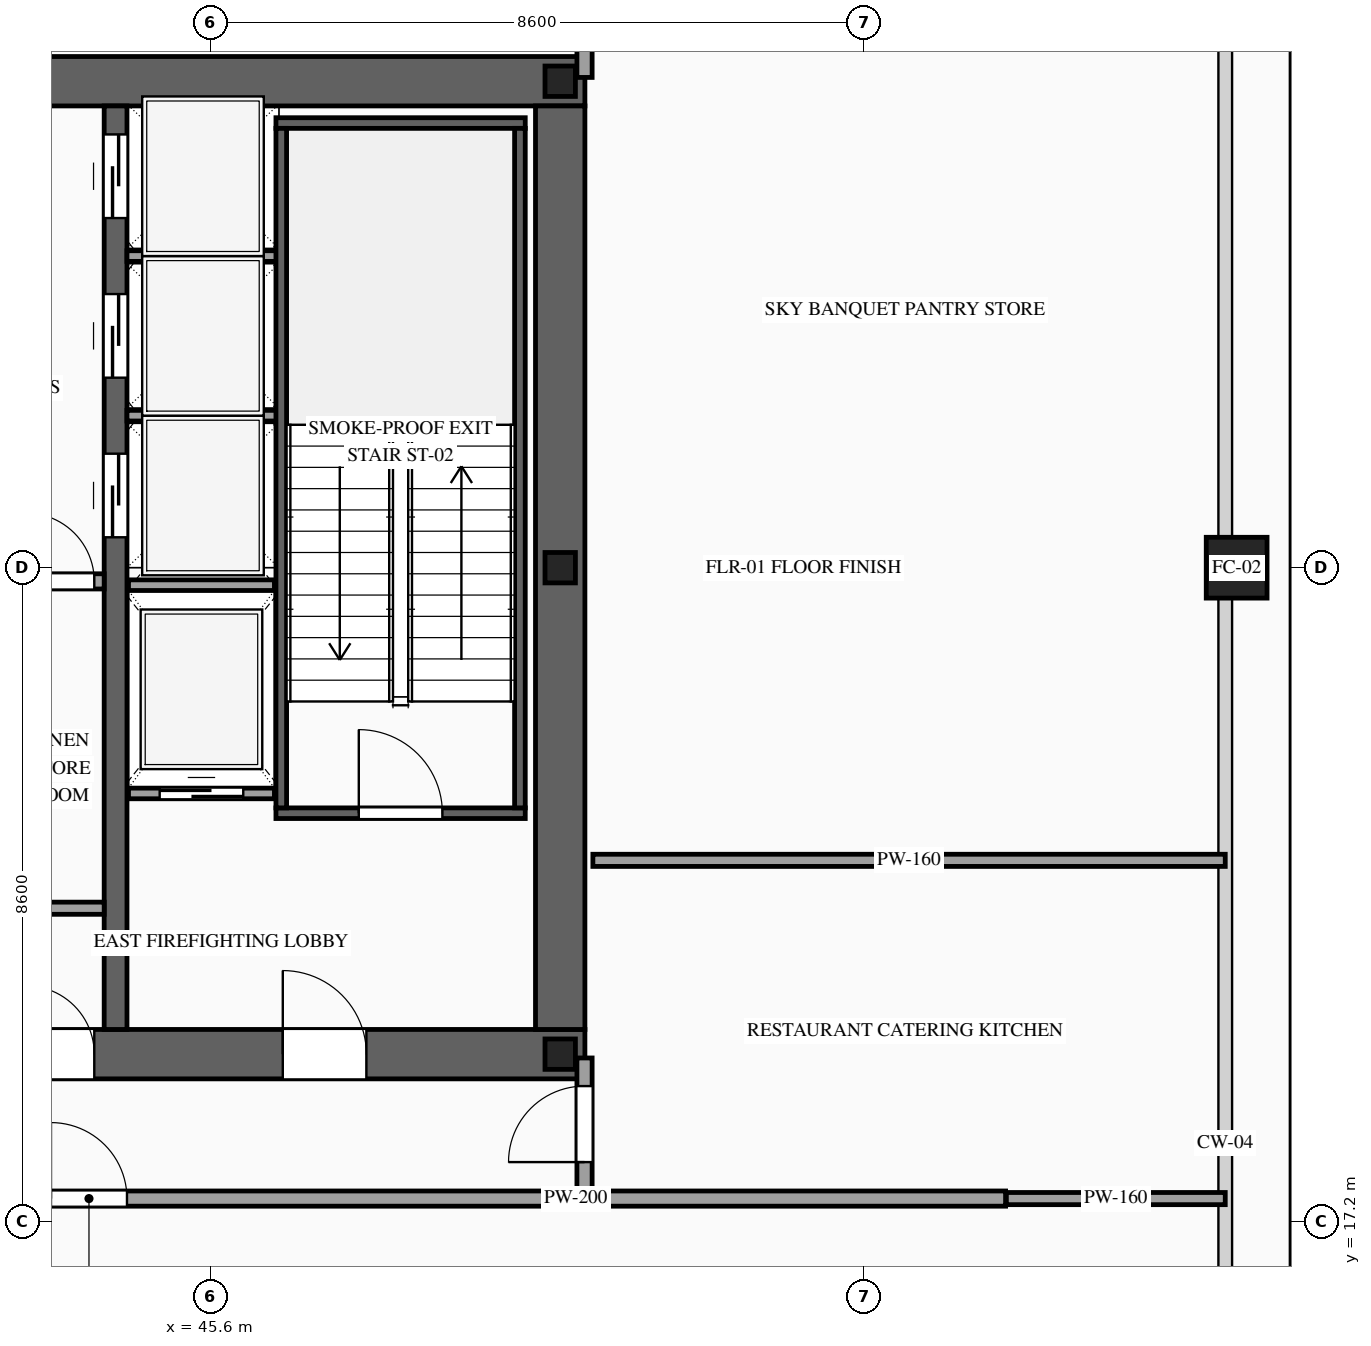
"""IFC4 building model, lengths in metres.
Left out: names, types, materials, properties, quantities, classifications, styles, units other than length and angle.
Written with IfcOpenShell. Run it as: python <this file> out.ifc"""

import sys

from ifc_helpers import new_model, si_unit, direction, frame, frame_2d, origin, origin_2d, place, context, subcontext, project, spatial, rectangle, hollow_rectangle, i_section, extrude, source, transform, mapped, element, fill, save


model = new_model("IFC4")
c1 = context("Model", 3, precision=1e-05, world=origin(), true_north=direction((0.0, 1.0)))
c2 = subcontext(c1, "Body", "Model", "MODEL_VIEW")
j1 = project(units=[si_unit("LENGTHUNIT", "METRE"), si_unit("PLANEANGLEUNIT", "RADIAN")], contexts=[c1])
p1 = place(None, origin())
s1 = spatial("IfcSite", under=j1, at=p1, CompositionType="ELEMENT")
p2 = place(p1, origin())
s2 = spatial("IfcBuilding", under=s1, at=p2, CompositionType="ELEMENT")
p3 = place(p2, frame((0.0, 0.0, 166.8)))
s3 = spatial("IfcBuildingStorey", under=s2, at=p3, CompositionType="ELEMENT", Elevation=166.8)
p4 = place(p3, frame((23.475, 19.4, 0.0), z_axis=(0.0, 0.0, 1.0), x_axis=(1.0, 0.0, 0.0)))
e1 = element("IfcWall", 1, at=p4, inside=s3, PredefinedType="SHEAR", context=c2, shape_type="SweptSolid", body=[
    extrude(rectangle(XDim=27.05, YDim=0.65, at=frame_2d((13.525, 0.0))), origin(), (0.0, 0.0, 1.0), 4.8),
])
p5 = place(p4, frame((1.975, 0.0, 0.0)))
e2 = element("IfcOpeningElement", 2, at=p5, cuts=e1, PredefinedType="OPENING", context=c2, shape_type="SweptSolid", body=[
    extrude(rectangle(XDim=1.1, YDim=2.2, at=frame_2d((0.55, 1.1))), frame((0.0, 0.34, 0.0), z_axis=(0.0, -1.0, 0.0), x_axis=(1.0, 0.0, 0.0)), (0.0, 0.0, 1.0), 0.68),
])
p6 = place(p4, frame((9.875, 0.0, 0.0)))
e3 = element("IfcOpeningElement", 3, at=p6, cuts=e1, PredefinedType="OPENING", context=c2, shape_type="SweptSolid", body=[
    extrude(rectangle(XDim=1.1, YDim=2.2, at=frame_2d((0.55, 1.1))), frame((0.0, 0.34, 0.0), z_axis=(0.0, -1.0, 0.0), x_axis=(1.0, 0.0, 0.0)), (0.0, 0.0, 1.0), 0.68),
])
p7 = place(p4, frame((23.075, 0.0, 0.0)))
e4 = element("IfcOpeningElement", 4, at=p7, cuts=e1, PredefinedType="OPENING", context=c2, shape_type="SweptSolid", body=[
    extrude(rectangle(XDim=1.1, YDim=2.2, at=frame_2d((0.55, 1.1))), frame((0.0, 0.34, 0.0), z_axis=(0.0, -1.0, 0.0), x_axis=(1.0, 0.0, 0.0)), (0.0, 0.0, 1.0), 0.68),
])
p8 = place(p4, frame((19.695, 0.0, 0.0)))
e5 = element("IfcOpeningElement", 5, at=p8, cuts=e1, PredefinedType="OPENING", context=c2, shape_type="SweptSolid", body=[
    extrude(rectangle(XDim=0.9, YDim=2.15, at=frame_2d((0.45, 1.075))), frame((0.0, 0.34, 0.0), z_axis=(0.0, -1.0, 0.0), x_axis=(1.0, 0.0, 0.0)), (0.0, 0.0, 1.0), 0.68),
])
p9 = place(p4, frame((18.255, 0.0, 0.0)))
e6 = element("IfcOpeningElement", 6, at=p9, cuts=e1, PredefinedType="OPENING", context=c2, shape_type="SweptSolid", body=[
    extrude(rectangle(XDim=0.9, YDim=2.15, at=frame_2d((0.45, 1.075))), frame((0.0, 0.34, 0.0), z_axis=(0.0, -1.0, 0.0), x_axis=(1.0, 0.0, 0.0)), (0.0, 0.0, 1.0), 0.68),
])
p10 = place(p3, frame((23.475, 32.2, 0.0), z_axis=(0.0, 0.0, 1.0), x_axis=(1.0, 0.0, 0.0)))
e7 = element("IfcWall", 7, at=p10, inside=s3, PredefinedType="SHEAR", context=c2, shape_type="SweptSolid", body=[
    extrude(rectangle(XDim=27.05, YDim=0.65, at=frame_2d((13.525, 0.0))), origin(), (0.0, 0.0, 1.0), 4.8),
])
p11 = place(p10, frame((4.595, 0.0, 0.0)))
e8 = element("IfcOpeningElement", 8, at=p11, cuts=e7, PredefinedType="OPENING", context=c2, shape_type="SweptSolid", body=[
    extrude(rectangle(XDim=0.9, YDim=2.15, at=frame_2d((0.45, 1.075))), frame((0.0, 0.34, 0.0), z_axis=(0.0, -1.0, 0.0), x_axis=(1.0, 0.0, 0.0)), (0.0, 0.0, 1.0), 0.68),
])
p12 = place(p10, frame((9.875, 0.0, 0.0)))
e9 = element("IfcOpeningElement", 9, at=p12, cuts=e7, PredefinedType="OPENING", context=c2, shape_type="SweptSolid", body=[
    extrude(rectangle(XDim=1.1, YDim=2.2, at=frame_2d((0.55, 1.1))), frame((0.0, 0.34, 0.0), z_axis=(0.0, -1.0, 0.0), x_axis=(1.0, 0.0, 0.0)), (0.0, 0.0, 1.0), 0.68),
])
p13 = place(p10, frame((15.725, 0.0, 0.0)))
e10 = element("IfcOpeningElement", 10, at=p13, cuts=e7, PredefinedType="OPENING", context=c2, shape_type="SweptSolid", body=[
    extrude(rectangle(XDim=1.1, YDim=2.2, at=frame_2d((0.55, 1.1))), frame((0.0, 0.34, 0.0), z_axis=(0.0, -1.0, 0.0), x_axis=(1.0, 0.0, 0.0)), (0.0, 0.0, 1.0), 0.68),
])
p14 = place(p10, frame((18.825, 0.0, 0.0)))
e11 = element("IfcOpeningElement", 11, at=p14, cuts=e7, PredefinedType="OPENING", context=c2, shape_type="SweptSolid", body=[
    extrude(rectangle(XDim=1.1, YDim=2.2, at=frame_2d((0.55, 1.1))), frame((0.0, 0.34, 0.0), z_axis=(0.0, -1.0, 0.0), x_axis=(1.0, 0.0, 0.0)), (0.0, 0.0, 1.0), 0.68),
])
m1 = source(origin(), c2, "Body", "SweptSolid", [
    extrude(rectangle(XDim=12.15, YDim=0.65, at=frame_2d((6.075, 0.0))), origin(), (0.0, 0.0, 1.0), 4.8),
])
p15 = place(p3, frame((50.2, 19.725, 0.0), z_axis=(0.0, 0.0, 1.0), x_axis=(0.0, 1.0, 0.0)))
e12 = element("IfcWall", 12, at=p15, inside=s3, PredefinedType="SHEAR", context=c2, shape_type="MappedRepresentation", body=[
    mapped(m1, transform((0.0, 0.0, 0.0), scale=1.0)),
])
p16 = place(p3, frame((44.35, 19.725, 0.0), z_axis=(0.0, 0.0, 1.0), x_axis=(0.0, 1.0, 0.0)))
e13 = element("IfcWall", 13, at=p16, inside=s3, PredefinedType="SOLIDWALL", context=c2, shape_type="SweptSolid", body=[
    extrude(rectangle(XDim=12.15, YDim=0.3, at=frame_2d((6.075, 0.0))), origin(), (0.0, 0.0, 1.0), 4.8),
])
p17 = place(p16, frame((6.475, 0.0, 0.0)))
e14 = element("IfcOpeningElement", 14, at=p17, cuts=e13, PredefinedType="OPENING", context=c2, shape_type="SweptSolid", body=[
    extrude(rectangle(XDim=1.1, YDim=2.2, at=frame_2d((0.55, 1.1))), frame((0.0, 0.165, 0.0), z_axis=(0.0, -1.0, 0.0), x_axis=(1.0, 0.0, 0.0)), (0.0, 0.0, 1.0), 0.33),
])
p18 = place(p16, frame((8.575, 0.0, 0.0)))
e15 = element("IfcOpeningElement", 15, at=p18, cuts=e13, PredefinedType="OPENING", context=c2, shape_type="SweptSolid", body=[
    extrude(rectangle(XDim=1.1, YDim=2.2, at=frame_2d((0.55, 1.1))), frame((0.0, 0.165, 0.0), z_axis=(0.0, -1.0, 0.0), x_axis=(1.0, 0.0, 0.0)), (0.0, 0.0, 1.0), 0.33),
])
p19 = place(p16, frame((10.675, 0.0, 0.0)))
e16 = element("IfcOpeningElement", 16, at=p19, cuts=e13, PredefinedType="OPENING", context=c2, shape_type="SweptSolid", body=[
    extrude(rectangle(XDim=1.1, YDim=2.2, at=frame_2d((0.55, 1.1))), frame((0.0, 0.165, 0.0), z_axis=(0.0, -1.0, 0.0), x_axis=(1.0, 0.0, 0.0)), (0.0, 0.0, 1.0), 0.33),
])
m2 = source(origin(), c2, "Body", "SweptSolid", [
    extrude(i_section(OverallWidth=0.4, OverallDepth=0.4, WebThickness=0.013, FlangeThickness=0.021, at=origin_2d()), origin(), (0.0, 0.0, 1.0), 4.8),
])
for number, where, z_axis, x_axis in (
    (17, (50.2, 19.4, 0.0), (0.0, 0.0, 1.0), (1.0, 0.0, 0.0)),
    (18, (50.2, 25.8, 0.0), (0.0, 0.0, 1.0), (1.0, 0.0, 0.0)),
    (19, (50.2, 32.2, 0.0), (0.0, 0.0, 1.0), (1.0, 0.0, 0.0)),
):
    element("IfcColumn", number, at=place(p3, frame(where, z_axis=z_axis, x_axis=x_axis)), inside=s3, PredefinedType="COLUMN", context=c2, shape_type="MappedRepresentation", body=[
        mapped(m2, transform((0.0, 0.0, 0.0), scale=1.0)),
    ])
m3 = source(origin(), c2, "Body", "SweptSolid", [
    extrude(hollow_rectangle(XDim=0.8, YDim=0.8, WallThickness=0.036, at=origin_2d()), origin(), (0.0, 0.0, 1.0), 4.8),
])
p20 = place(p3, frame((59.1, 25.8, 0.0), z_axis=(0.0, 0.0, 1.0), x_axis=(1.0, 0.0, 0.0)))
e20 = element("IfcColumn", 20, at=p20, inside=s3, PredefinedType="COLUMN", context=c2, shape_type="MappedRepresentation", body=[
    mapped(m3, transform((0.0, 0.0, 0.0), scale=1.0)),
])
p21 = place(p3, frame((44.52, 22.83, 0.0), z_axis=(0.0, 0.0, 1.0), x_axis=(1.0, 0.0, 0.0)))
e21 = element("IfcWall", 21, at=p21, inside=s3, PredefinedType="SOLIDWALL", context=c2, shape_type="SweptSolid", body=[
    extrude(rectangle(XDim=1.92, YDim=0.14, at=frame_2d((0.96, 0.0))), origin(), (0.0, 0.0, 1.0), 4.5),
])
p22 = place(p21, frame((0.41, 0.0, 0.0)))
e22 = element("IfcOpeningElement", 22, at=p22, cuts=e21, PredefinedType="OPENING", context=c2, shape_type="SweptSolid", body=[
    extrude(rectangle(XDim=1.1, YDim=2.2, at=frame_2d((0.55, 1.1))), frame((0.0, 0.085, 0.0), z_axis=(0.0, -1.0, 0.0), x_axis=(1.0, 0.0, 0.0)), (0.0, 0.0, 1.0), 0.17),
])
m4 = source(origin(), c2, "Body", "SweptSolid", [
    extrude(rectangle(XDim=1.92, YDim=0.14, at=frame_2d((0.96, 0.0))), origin(), (0.0, 0.0, 1.0), 4.5),
])
p23 = place(p3, frame((44.52, 25.57, 0.0), z_axis=(0.0, 0.0, 1.0), x_axis=(1.0, 0.0, 0.0)))
e23 = element("IfcWall", 23, at=p23, inside=s3, PredefinedType="SOLIDWALL", context=c2, shape_type="MappedRepresentation", body=[
    mapped(m4, transform((0.0, 0.0, 0.0), scale=1.0)),
])
m5 = source(origin(), c2, "Body", "SweptSolid", [
    extrude(rectangle(XDim=2.0, YDim=0.14, at=frame_2d((1.0, 0.0))), origin(), (0.0, 0.0, 1.0), 4.5),
])
for number, where, z_axis, x_axis in (
    (24, (44.5, 27.8, 0.0), (0.0, 0.0, 1.0), (1.0, 0.0, 0.0)),
    (25, (44.5, 29.9, 0.0), (0.0, 0.0, 1.0), (1.0, 0.0, 0.0)),
):
    element("IfcWall", number, at=place(p3, frame(where, z_axis=z_axis, x_axis=x_axis)), inside=s3, PredefinedType="SOLIDWALL", context=c2, shape_type="MappedRepresentation", body=[
        mapped(m5, transform((0.0, 0.0, 0.0), scale=1.0)),
    ])
p24 = place(p3, frame((46.46, 22.57, 0.0), z_axis=(0.0, 0.0, 1.0), x_axis=(1.0, 0.0, 0.0)))
e26 = element("IfcWall", 26, at=p24, inside=s3, PredefinedType="SOLIDWALL", context=c2, shape_type="SweptSolid", body=[
    extrude(rectangle(XDim=3.28, YDim=0.14, at=frame_2d((1.64, 0.0))), origin(), (0.0, 0.0, 1.0), 4.5),
])
p25 = place(p24, frame((1.09, 0.0, 0.0)))
e27 = element("IfcOpeningElement", 27, at=p25, cuts=e26, PredefinedType="OPENING", context=c2, shape_type="SweptSolid", body=[
    extrude(rectangle(XDim=1.1, YDim=2.2, at=frame_2d((0.55, 1.1))), frame((0.0, 0.085, 0.0), z_axis=(0.0, -1.0, 0.0), x_axis=(1.0, 0.0, 0.0)), (0.0, 0.0, 1.0), 0.17),
])
m6 = source(origin(), c2, "Body", "SweptSolid", [
    extrude(rectangle(XDim=3.28, YDim=0.14, at=frame_2d((1.64, 0.0))), origin(), (0.0, 0.0, 1.0), 4.5),
])
p26 = place(p3, frame((46.46, 31.65, 0.0), z_axis=(0.0, 0.0, 1.0), x_axis=(1.0, 0.0, 0.0)))
e28 = element("IfcWall", 28, at=p26, inside=s3, PredefinedType="SOLIDWALL", context=c2, shape_type="MappedRepresentation", body=[
    mapped(m6, transform((0.0, 0.0, 0.0), scale=1.0)),
])
m7 = source(origin(), c2, "Body", "SweptSolid", [
    extrude(rectangle(XDim=8.94, YDim=0.14, at=frame_2d((4.47, 0.0))), origin(), (0.0, 0.0, 1.0), 4.5),
])
for number, where, z_axis, x_axis in (
    (29, (46.53, 22.64, 0.0), (0.0, 0.0, 1.0), (0.0, 1.0, 0.0)),
    (30, (49.67, 22.64, 0.0), (0.0, 0.0, 1.0), (0.0, 1.0, 0.0)),
):
    element("IfcWall", number, at=place(p3, frame(where, z_axis=z_axis, x_axis=x_axis)), inside=s3, PredefinedType="SOLIDWALL", context=c2, shape_type="MappedRepresentation", body=[
        mapped(m7, transform((0.0, 0.0, 0.0), scale=1.0)),
    ])
m8 = source(origin(), c2, "Body", "SweptSolid", [
    extrude(rectangle(XDim=1.17, YDim=0.16, at=frame_2d((0.585, 0.0))), origin(), (0.0, 0.0, 1.0), 4.5),
])
p27 = place(p3, frame((43.03, 21.32, 0.0), z_axis=(0.0, 0.0, 1.0), x_axis=(1.0, 0.0, 0.0)))
e31 = element("IfcWall", 31, at=p27, inside=s3, PredefinedType="PARTITIONING", context=c2, shape_type="MappedRepresentation", body=[
    mapped(m8, transform((0.0, 0.0, 0.0), scale=1.0)),
])
p28 = place(p3, frame((43.05, 25.62, 0.0), z_axis=(0.0, 0.0, 1.0), x_axis=(1.0, 0.0, 0.0)))
e32 = element("IfcWall", 32, at=p28, inside=s3, PredefinedType="PARTITIONING", context=c2, shape_type="SweptSolid", body=[
    extrude(rectangle(XDim=1.15, YDim=0.2, at=frame_2d((0.575, 0.0))), origin(), (0.0, 0.0, 1.0), 4.5),
])
p29 = place(p28, frame((0.12, 0.0, 0.0)))
e33 = element("IfcOpeningElement", 33, at=p29, cuts=e32, PredefinedType="OPENING", context=c2, shape_type="SweptSolid", body=[
    extrude(rectangle(XDim=0.9, YDim=2.15, at=frame_2d((0.45, 1.075))), frame((0.0, 0.115, 0.0), z_axis=(0.0, -1.0, 0.0), x_axis=(1.0, 0.0, 0.0)), (0.0, 0.0, 1.0), 0.23),
])
p30 = place(p3, frame((37.2, 17.5, 0.0), z_axis=(0.0, 0.0, 1.0), x_axis=(1.0, 0.0, 0.0)))
e34 = element("IfcWall", 34, at=p30, inside=s3, PredefinedType="PARTITIONING", context=c2, shape_type="SweptSolid", body=[
    extrude(rectangle(XDim=18.86, YDim=0.2, at=frame_2d((9.43, 0.0))), origin(), (0.0, 0.0, 1.0), 4.5),
])
p31 = place(p30, frame((6.3, 0.0, 0.0)))
e35 = element("IfcOpeningElement", 35, at=p31, cuts=e34, PredefinedType="OPENING", context=c2, shape_type="SweptSolid", body=[
    extrude(rectangle(XDim=1.0, YDim=2.2, at=frame_2d((0.5, 1.1))), frame((0.0, 0.115, 0.0), z_axis=(0.0, -1.0, 0.0), x_axis=(1.0, 0.0, 0.0)), (0.0, 0.0, 1.0), 0.23),
])
p32 = place(p3, frame((50.52, 17.61, 0.0), z_axis=(0.0, 0.0, 1.0), x_axis=(0.0, 1.0, 0.0)))
e36 = element("IfcWall", 36, at=p32, inside=s3, PredefinedType="PARTITIONING", context=c2, shape_type="SweptSolid", body=[
    extrude(rectangle(XDim=1.74, YDim=0.2, at=frame_2d((0.87, 0.0))), origin(), (0.0, 0.0, 1.0), 4.5),
])
p33 = place(p32, frame((0.37, 0.0, 0.0)))
e37 = element("IfcOpeningElement", 37, at=p33, cuts=e36, PredefinedType="OPENING", context=c2, shape_type="SweptSolid", body=[
    extrude(rectangle(XDim=1.0, YDim=2.2, at=frame_2d((0.5, 1.1))), frame((0.0, 0.115, 0.0), z_axis=(0.0, -1.0, 0.0), x_axis=(1.0, 0.0, 0.0)), (0.0, 0.0, 1.0), 0.23),
])
m9 = source(origin(), c2, "Body", "SweptSolid", [
    extrude(rectangle(XDim=2.88, YDim=0.16, at=frame_2d((1.44, 0.0))), origin(), (0.0, 0.0, 1.0), 4.5),
])
p34 = place(p3, frame((56.07, 17.5, 0.0), z_axis=(0.0, 0.0, 1.0), x_axis=(1.0, 0.0, 0.0)))
e38 = element("IfcWall", 38, at=p34, inside=s3, PredefinedType="PARTITIONING", context=c2, shape_type="MappedRepresentation", body=[
    mapped(m9, transform((0.0, 0.0, 0.0), scale=1.0)),
])
m10 = source(origin(), c2, "Body", "SweptSolid", [
    extrude(rectangle(XDim=8.32, YDim=0.16, at=frame_2d((4.16, 0.0))), origin(), (0.0, 0.0, 1.0), 4.5),
])
p35 = place(p3, frame((50.63, 21.95, 0.0), z_axis=(0.0, 0.0, 1.0), x_axis=(1.0, 0.0, 0.0)))
e39 = element("IfcWall", 39, at=p35, inside=s3, PredefinedType="PARTITIONING", context=c2, shape_type="MappedRepresentation", body=[
    mapped(m10, transform((0.0, 0.0, 0.0), scale=1.0)),
])
p36 = place(p3, frame((50.52, 32.25, 0.0), z_axis=(0.0, 0.0, 1.0), x_axis=(0.0, 1.0, 0.0)))
e40 = element("IfcWall", 40, at=p36, inside=s3, PredefinedType="PARTITIONING", context=c2, shape_type="SweptSolid", body=[
    extrude(rectangle(XDim=1.74, YDim=0.2, at=frame_2d((0.87, 0.0))), origin(), (0.0, 0.0, 1.0), 4.5),
])
p37 = place(p36, frame((0.37, 0.0, 0.0)))
e41 = element("IfcOpeningElement", 41, at=p37, cuts=e40, PredefinedType="OPENING", context=c2, shape_type="SweptSolid", body=[
    extrude(rectangle(XDim=1.0, YDim=2.2, at=frame_2d((0.5, 1.1))), frame((0.0, 0.115, 0.0), z_axis=(0.0, -1.0, 0.0), x_axis=(1.0, 0.0, 0.0)), (0.0, 0.0, 1.0), 0.23),
])
m11 = source(origin(), c2, "Body", "SweptSolid", [
    extrude(rectangle(XDim=1.1, YDim=2.2, at=frame_2d((0.55, 1.1))), frame((0.0, 0.025, 0.0), z_axis=(0.0, -1.0, 0.0), x_axis=(1.0, 0.0, 0.0)), (0.0, 0.0, 1.0), 0.05),
])
p38 = place(p22, origin())
e42 = element("IfcDoor", 42, at=p38, inside=s3, OperationType="SLIDING_TO_RIGHT", PredefinedType="DOOR", context=c2, shape_type="MappedRepresentation", body=[
    mapped(m11, transform((0.0, 0.0, 0.0), scale=1.0)),
])
fill(e22, e42)
p39 = place(p17, origin())
e43 = element("IfcDoor", 43, at=p39, inside=s3, OperationType="SLIDING_TO_LEFT", PredefinedType="DOOR", context=c2, shape_type="MappedRepresentation", body=[
    mapped(m11, transform((0.0, 0.0, 0.0), scale=1.0)),
])
fill(e14, e43)
p40 = place(p18, origin())
e44 = element("IfcDoor", 44, at=p40, inside=s3, OperationType="SLIDING_TO_RIGHT", PredefinedType="DOOR", context=c2, shape_type="MappedRepresentation", body=[
    mapped(m11, transform((0.0, 0.0, 0.0), scale=1.0)),
])
fill(e15, e44)
p41 = place(p19, origin())
e45 = element("IfcDoor", 45, at=p41, inside=s3, OperationType="SLIDING_TO_LEFT", PredefinedType="DOOR", context=c2, shape_type="MappedRepresentation", body=[
    mapped(m11, transform((0.0, 0.0, 0.0), scale=1.0)),
])
fill(e16, e45)
m12 = source(origin(), c2, "Body", "SweptSolid", [
    extrude(rectangle(XDim=1.1, YDim=2.2, at=frame_2d((0.55, 1.1))), frame((0.0, 0.025, 0.0), z_axis=(0.0, -1.0, 0.0), x_axis=(1.0, 0.0, 0.0)), (0.0, 0.0, 1.0), 0.05),
])
p42 = place(p25, origin())
e46 = element("IfcDoor", 46, at=p42, inside=s3, OperationType="SINGLE_SWING_LEFT", PredefinedType="DOOR", context=c2, shape_type="MappedRepresentation", body=[
    mapped(m12, transform((0.0, 0.0, 0.0), scale=1.0)),
])
fill(e27, e46)
p43 = place(p7, origin())
e47 = element("IfcDoor", 47, at=p43, inside=s3, OperationType="SINGLE_SWING_LEFT", PredefinedType="DOOR", context=c2, shape_type="MappedRepresentation", body=[
    mapped(m12, transform((0.0, 0.0, 0.0), scale=1.0)),
])
fill(e4, e47)
m13 = source(origin(), c2, "Body", "SweptSolid", [
    extrude(rectangle(XDim=0.9, YDim=2.15, at=frame_2d((0.45, 1.075))), frame((0.0, 0.025, 0.0), z_axis=(0.0, -1.0, 0.0), x_axis=(1.0, 0.0, 0.0)), (0.0, 0.0, 1.0), 0.05),
])
p44 = place(p8, origin())
e48 = element("IfcDoor", 48, at=p44, inside=s3, OperationType="SINGLE_SWING_LEFT", PredefinedType="DOOR", context=c2, shape_type="MappedRepresentation", body=[
    mapped(m13, transform((0.0, 0.0, 0.0), scale=1.0)),
])
fill(e5, e48)
p45 = place(p29, origin())
e49 = element("IfcDoor", 49, at=p45, inside=s3, OperationType="SINGLE_SWING_LEFT", PredefinedType="DOOR", context=c2, shape_type="MappedRepresentation", body=[
    mapped(m13, transform((0.0, 0.0, 0.0), scale=1.0)),
])
fill(e33, e49)
m14 = source(origin(), c2, "Body", "SweptSolid", [
    extrude(rectangle(XDim=1.0, YDim=2.2, at=frame_2d((0.5, 1.1))), frame((0.0, 0.025, 0.0), z_axis=(0.0, -1.0, 0.0), x_axis=(1.0, 0.0, 0.0)), (0.0, 0.0, 1.0), 0.05),
])
p46 = place(p31, origin())
e50 = element("IfcDoor", 50, at=p46, inside=s3, OperationType="SINGLE_SWING_LEFT", PredefinedType="DOOR", context=c2, shape_type="MappedRepresentation", body=[
    mapped(m14, transform((0.0, 0.0, 0.0), scale=1.0)),
])
fill(e35, e50)
p47 = place(p33, origin())
e51 = element("IfcDoor", 51, at=p47, inside=s3, OperationType="SINGLE_SWING_LEFT", PredefinedType="DOOR", context=c2, shape_type="MappedRepresentation", body=[
    mapped(m14, transform((0.0, 0.0, 0.0), scale=1.0)),
])
fill(e37, e51)
save(model, sys.argv[1])
